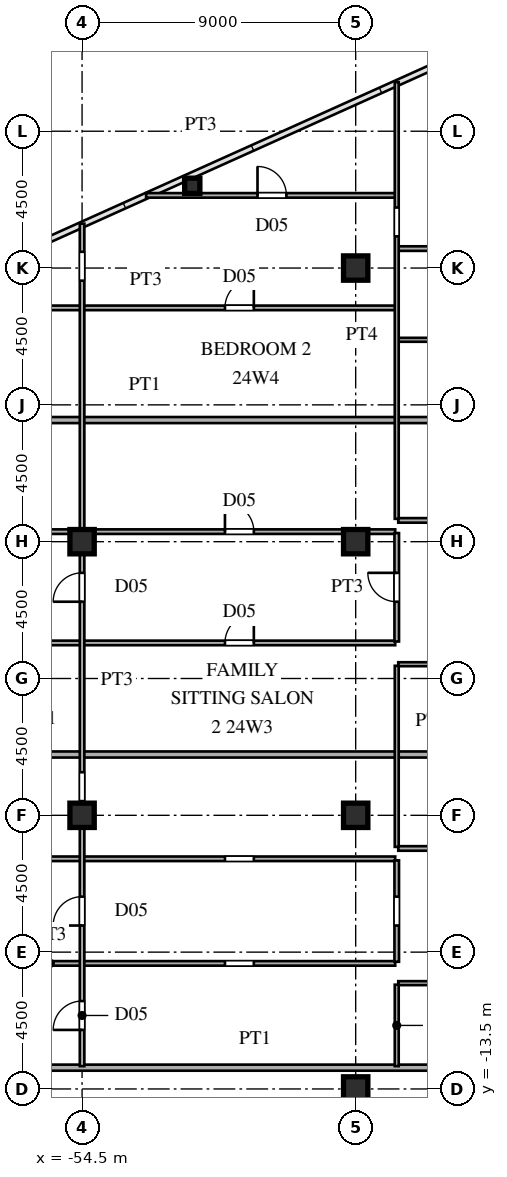
"""IFC4 building model, lengths in metres.
Left out: names, types, materials, properties, quantities, classifications, styles, units other than length and angle.
Written with IfcOpenShell. Run it as: python <this file> out.ifc"""

import sys

from ifc_helpers import new_model, si_unit, direction, frame, frame_2d, origin, origin_2d, place, context, subcontext, project, spatial, rectangle, hollow_rectangle, i_section, extrude, source, transform, mapped, element, fill, save


model = new_model("IFC4")
c1 = context("Model", 3, precision=1e-05, world=origin(), true_north=direction((0.0, 1.0)))
c2 = subcontext(c1, "Body", "Model", "MODEL_VIEW")
j1 = project(units=[si_unit("LENGTHUNIT", "METRE"), si_unit("PLANEANGLEUNIT", "RADIAN")], contexts=[c1])
p1 = place(None, origin())
s1 = spatial("IfcSite", under=j1, at=p1, CompositionType="ELEMENT")
p2 = place(p1, origin())
s2 = spatial("IfcBuilding", under=s1, at=p2, CompositionType="ELEMENT")
p3 = place(p2, frame((0.0, 0.0, 92.4)))
s3 = spatial("IfcBuildingStorey", under=s2, at=p3, CompositionType="ELEMENT", Elevation=92.4)
m1 = source(origin(), c2, "Body", "SweptSolid", [
    extrude(i_section(OverallWidth=0.8, OverallDepth=0.8, WebThickness=0.032, FlangeThickness=0.05, at=origin_2d()), origin(), (0.0, 0.0, 1.0), 3.6),
])
for number, where, z_axis, x_axis in (
    (1, (-45.5, -13.5, 0.0), (0.0, 0.0, 1.0), (1.0, 0.0, 0.0)),
    (2, (-45.5, -4.5, 0.0), (0.0, 0.0, 1.0), (1.0, 0.0, 0.0)),
    (3, (-45.5, 4.5, 0.0), (0.0, 0.0, 1.0), (1.0, 0.0, 0.0)),
    (4, (-45.5, 13.5, 0.0), (0.0, 0.0, 1.0), (1.0, 0.0, 0.0)),
    (5, (-54.5, -4.5, 0.0), (0.0, 0.0, 1.0), (1.0, 0.0, 0.0)),
    (6, (-54.5, 4.5, 0.0), (0.0, 0.0, 1.0), (1.0, 0.0, 0.0)),
):
    element("IfcColumn", number, at=place(p3, frame(where, z_axis=z_axis, x_axis=x_axis)), inside=s3, PredefinedType="COLUMN", context=c2, shape_type="MappedRepresentation", body=[
        mapped(m1, transform((0.0, 0.0, 0.0), scale=1.0)),
    ])
m2 = source(origin(), c2, "Body", "SweptSolid", [
    extrude(hollow_rectangle(XDim=0.5, YDim=0.5, WallThickness=0.02, at=origin_2d()), origin(), (0.0, 0.0, 1.0), 3.6),
])
p4 = place(p3, frame((-50.875, 16.205, 0.0), z_axis=(0.0, 0.0, 1.0), x_axis=(1.0, 0.0, 0.0)))
e7 = element("IfcColumn", 7, at=p4, inside=s3, PredefinedType="COLUMN", context=c2, shape_type="MappedRepresentation", body=[
    mapped(m2, transform((0.0, 0.0, 0.0), scale=1.0)),
])
p5 = place(p3, frame((-59.234, -12.8, 0.0), z_axis=(0.0, 0.0, 1.0), x_axis=(1.0, 0.0, 0.0)))
e8 = element("IfcWall", 8, at=p5, inside=s3, PredefinedType="PARTITIONING", context=c2, shape_type="SweptSolid", body=[
    extrude(rectangle(XDim=20.854, YDim=0.2, at=frame_2d((10.427, 0.0))), origin(), (0.0, 0.0, 1.0), 3.38),
])
p6 = place(p3, frame((-44.1, -10.02, 0.0), z_axis=(0.0, 0.0, 1.0), x_axis=(1.0, 0.0, 0.0)))
e9 = element("IfcWall", 9, at=p6, inside=s3, PredefinedType="PARTITIONING", context=c2, shape_type="SweptSolid", body=[
    extrude(rectangle(XDim=5.75, YDim=0.13, at=frame_2d((2.875, 0.0))), origin(), (0.0, 0.0, 1.0), 3.38),
])
p7 = place(p6, frame((2.435, 0.0, 0.0)))
e10 = element("IfcOpeningElement", 10, at=p7, cuts=e9, PredefinedType="OPENING", context=c2, shape_type="SweptSolid", body=[
    extrude(rectangle(XDim=0.88, YDim=2.1, at=frame_2d((0.44, 1.05))), frame((0.0, 0.075, 0.0), z_axis=(0.0, -1.0, 0.0), x_axis=(1.0, 0.0, 0.0)), (0.0, 0.0, 1.0), 0.15),
])
p8 = place(p3, frame((-66.887, -9.37, 0.0), z_axis=(0.0, 0.0, 1.0), x_axis=(1.0, 0.0, 0.0)))
e11 = element("IfcWall", 11, at=p8, inside=s3, PredefinedType="PARTITIONING", context=c2, shape_type="SweptSolid", body=[
    extrude(rectangle(XDim=22.687, YDim=0.15, at=frame_2d((11.344, 0.0))), origin(), (0.0, 0.0, 1.0), 3.38),
])
p9 = place(p8, frame((17.087, 0.0, 0.0)))
e12 = element("IfcOpeningElement", 12, at=p9, cuts=e11, PredefinedType="OPENING", context=c2, shape_type="SweptSolid", body=[
    extrude(rectangle(XDim=0.95, YDim=2.15, at=frame_2d((0.475, 1.075))), frame((0.0, 0.085, 0.0), z_axis=(0.0, -1.0, 0.0), x_axis=(1.0, 0.0, 0.0)), (0.0, 0.0, 1.0), 0.17),
])
p10 = place(p3, frame((-71.035, -5.93, 0.0), z_axis=(0.0, 0.0, 1.0), x_axis=(1.0, 0.0, 0.0)))
e13 = element("IfcWall", 13, at=p10, inside=s3, PredefinedType="PARTITIONING", context=c2, shape_type="SweptSolid", body=[
    extrude(rectangle(XDim=26.835, YDim=0.15, at=frame_2d((13.417, 0.0))), origin(), (0.0, 0.0, 1.0), 3.38),
])
p11 = place(p10, frame((21.235, 0.0, 0.0)))
e14 = element("IfcOpeningElement", 14, at=p11, cuts=e13, PredefinedType="OPENING", context=c2, shape_type="SweptSolid", body=[
    extrude(rectangle(XDim=0.95, YDim=2.15, at=frame_2d((0.475, 1.075))), frame((0.0, 0.085, 0.0), z_axis=(0.0, -1.0, 0.0), x_axis=(1.0, 0.0, 0.0)), (0.0, 0.0, 1.0), 0.17),
])
p12 = place(p3, frame((-44.1, -5.59, 0.0), z_axis=(0.0, 0.0, 1.0), x_axis=(1.0, 0.0, 0.0)))
e15 = element("IfcWall", 15, at=p12, inside=s3, PredefinedType="PARTITIONING", context=c2, shape_type="SweptSolid", body=[
    extrude(rectangle(XDim=5.75, YDim=0.15, at=frame_2d((2.875, 0.0))), origin(), (0.0, 0.0, 1.0), 3.38),
])
p13 = place(p12, frame((2.4, 0.0, 0.0)))
e16 = element("IfcOpeningElement", 16, at=p13, cuts=e15, PredefinedType="OPENING", context=c2, shape_type="SweptSolid", body=[
    extrude(rectangle(XDim=0.95, YDim=2.15, at=frame_2d((0.475, 1.075))), frame((0.0, 0.085, 0.0), z_axis=(0.0, -1.0, 0.0), x_axis=(1.0, 0.0, 0.0)), (0.0, 0.0, 1.0), 0.17),
])
p14 = place(p3, frame((-71.005, -2.5, 0.0), z_axis=(0.0, 0.0, 1.0), x_axis=(1.0, 0.0, 0.0)))
e17 = element("IfcWall", 17, at=p14, inside=s3, PredefinedType="PARTITIONING", context=c2, shape_type="SweptSolid", body=[
    extrude(rectangle(XDim=32.625, YDim=0.2, at=frame_2d((16.312, 0.0))), origin(), (0.0, 0.0, 1.0), 3.38),
])
p15 = place(p3, frame((-44.1, 0.47, 0.0), z_axis=(0.0, 0.0, 1.0), x_axis=(1.0, 0.0, 0.0)))
e18 = element("IfcWall", 18, at=p15, inside=s3, PredefinedType="PARTITIONING", context=c2, shape_type="SweptSolid", body=[
    extrude(rectangle(XDim=5.75, YDim=0.13, at=frame_2d((2.875, 0.0))), origin(), (0.0, 0.0, 1.0), 3.38),
])
p16 = place(p15, frame((2.435, 0.0, 0.0)))
e19 = element("IfcOpeningElement", 19, at=p16, cuts=e18, PredefinedType="OPENING", context=c2, shape_type="SweptSolid", body=[
    extrude(rectangle(XDim=0.88, YDim=2.1, at=frame_2d((0.44, 1.05))), frame((0.0, 0.075, 0.0), z_axis=(0.0, -1.0, 0.0), x_axis=(1.0, 0.0, 0.0)), (0.0, 0.0, 1.0), 0.15),
])
p17 = place(p3, frame((-71.035, 1.17, 0.0), z_axis=(0.0, 0.0, 1.0), x_axis=(1.0, 0.0, 0.0)))
e20 = element("IfcWall", 20, at=p17, inside=s3, PredefinedType="PARTITIONING", context=c2, shape_type="SweptSolid", body=[
    extrude(rectangle(XDim=26.835, YDim=0.15, at=frame_2d((13.417, 0.0))), origin(), (0.0, 0.0, 1.0), 3.38),
])
p18 = place(p17, frame((21.235, 0.0, 0.0)))
e21 = element("IfcOpeningElement", 21, at=p18, cuts=e20, PredefinedType="OPENING", context=c2, shape_type="SweptSolid", body=[
    extrude(rectangle(XDim=0.95, YDim=2.15, at=frame_2d((0.475, 1.075))), frame((0.0, 0.085, 0.0), z_axis=(0.0, -1.0, 0.0), x_axis=(1.0, 0.0, 0.0)), (0.0, 0.0, 1.0), 0.17),
])
p19 = place(p17, frame((13.21, 0.0, 0.0)))
e22 = element("IfcOpeningElement", 22, at=p19, cuts=e20, PredefinedType="OPENING", context=c2, shape_type="SweptSolid", body=[
    extrude(rectangle(XDim=0.95, YDim=2.15, at=frame_2d((0.475, 1.075))), frame((0.0, 0.085, 0.0), z_axis=(0.0, -1.0, 0.0), x_axis=(1.0, 0.0, 0.0)), (0.0, 0.0, 1.0), 0.17),
])
p20 = place(p3, frame((-71.035, 4.83, 0.0), z_axis=(0.0, 0.0, 1.0), x_axis=(1.0, 0.0, 0.0)))
e23 = element("IfcWall", 23, at=p20, inside=s3, PredefinedType="PARTITIONING", context=c2, shape_type="SweptSolid", body=[
    extrude(rectangle(XDim=26.835, YDim=0.15, at=frame_2d((13.417, 0.0))), origin(), (0.0, 0.0, 1.0), 3.38),
])
p21 = place(p20, frame((21.235, 0.0, 0.0)))
e24 = element("IfcOpeningElement", 24, at=p21, cuts=e23, PredefinedType="OPENING", context=c2, shape_type="SweptSolid", body=[
    extrude(rectangle(XDim=0.95, YDim=2.15, at=frame_2d((0.475, 1.075))), frame((0.0, 0.085, 0.0), z_axis=(0.0, -1.0, 0.0), x_axis=(1.0, 0.0, 0.0)), (0.0, 0.0, 1.0), 0.17),
])
p22 = place(p20, frame((13.21, 0.0, 0.0)))
e25 = element("IfcOpeningElement", 25, at=p22, cuts=e23, PredefinedType="OPENING", context=c2, shape_type="SweptSolid", body=[
    extrude(rectangle(XDim=0.95, YDim=2.15, at=frame_2d((0.475, 1.075))), frame((0.0, 0.085, 0.0), z_axis=(0.0, -1.0, 0.0), x_axis=(1.0, 0.0, 0.0)), (0.0, 0.0, 1.0), 0.17),
])
p23 = place(p3, frame((-44.1, 5.2, 0.0), z_axis=(0.0, 0.0, 1.0), x_axis=(1.0, 0.0, 0.0)))
e26 = element("IfcWall", 26, at=p23, inside=s3, PredefinedType="PARTITIONING", context=c2, shape_type="SweptSolid", body=[
    extrude(rectangle(XDim=5.75, YDim=0.15, at=frame_2d((2.875, 0.0))), origin(), (0.0, 0.0, 1.0), 3.38),
])
p24 = place(p23, frame((2.4, 0.0, 0.0)))
e27 = element("IfcOpeningElement", 27, at=p24, cuts=e26, PredefinedType="OPENING", context=c2, shape_type="SweptSolid", body=[
    extrude(rectangle(XDim=0.95, YDim=2.15, at=frame_2d((0.475, 1.075))), frame((0.0, 0.085, 0.0), z_axis=(0.0, -1.0, 0.0), x_axis=(1.0, 0.0, 0.0)), (0.0, 0.0, 1.0), 0.17),
])
p25 = place(p3, frame((-68.79, 8.5, 0.0), z_axis=(0.0, 0.0, 1.0), x_axis=(1.0, 0.0, 0.0)))
e28 = element("IfcWall", 28, at=p25, inside=s3, PredefinedType="PARTITIONING", context=c2, shape_type="SweptSolid", body=[
    extrude(rectangle(XDim=30.41, YDim=0.2, at=frame_2d((15.205, 0.0))), origin(), (0.0, 0.0, 1.0), 3.38),
])
p26 = place(p3, frame((-44.1, 11.14, 0.0), z_axis=(0.0, 0.0, 1.0), x_axis=(1.0, 0.0, 0.0)))
e29 = element("IfcWall", 29, at=p26, inside=s3, PredefinedType="PARTITIONING", context=c2, shape_type="SweptSolid", body=[
    extrude(rectangle(XDim=5.75, YDim=0.13, at=frame_2d((2.875, 0.0))), origin(), (0.0, 0.0, 1.0), 3.38),
])
p27 = place(p26, frame((2.435, 0.0, 0.0)))
e30 = element("IfcOpeningElement", 30, at=p27, cuts=e29, PredefinedType="OPENING", context=c2, shape_type="SweptSolid", body=[
    extrude(rectangle(XDim=0.88, YDim=2.1, at=frame_2d((0.44, 1.05))), frame((0.0, 0.075, 0.0), z_axis=(0.0, -1.0, 0.0), x_axis=(1.0, 0.0, 0.0)), (0.0, 0.0, 1.0), 0.15),
])
p28 = place(p3, frame((-60.603, 12.19, 0.0), z_axis=(0.0, 0.0, 1.0), x_axis=(1.0, 0.0, 0.0)))
e31 = element("IfcWall", 31, at=p28, inside=s3, PredefinedType="PARTITIONING", context=c2, shape_type="SweptSolid", body=[
    extrude(rectangle(XDim=16.403, YDim=0.15, at=frame_2d((8.202, 0.0))), origin(), (0.0, 0.0, 1.0), 3.38),
])
p29 = place(p28, frame((10.803, 0.0, 0.0)))
e32 = element("IfcOpeningElement", 32, at=p29, cuts=e31, PredefinedType="OPENING", context=c2, shape_type="SweptSolid", body=[
    extrude(rectangle(XDim=0.95, YDim=2.15, at=frame_2d((0.475, 1.075))), frame((0.0, 0.085, 0.0), z_axis=(0.0, -1.0, 0.0), x_axis=(1.0, 0.0, 0.0)), (0.0, 0.0, 1.0), 0.17),
])
p30 = place(p28, frame((2.594, 0.0, 0.0)))
e33 = element("IfcOpeningElement", 33, at=p30, cuts=e31, PredefinedType="OPENING", context=c2, shape_type="SweptSolid", body=[
    extrude(rectangle(XDim=0.95, YDim=2.15, at=frame_2d((0.475, 1.075))), frame((0.0, 0.085, 0.0), z_axis=(0.0, -1.0, 0.0), x_axis=(1.0, 0.0, 0.0)), (0.0, 0.0, 1.0), 0.17),
])
p31 = place(p3, frame((-44.1, 14.14, 0.0), z_axis=(0.0, 0.0, 1.0), x_axis=(1.0, 0.0, 0.0)))
e34 = element("IfcWall", 34, at=p31, inside=s3, PredefinedType="PARTITIONING", context=c2, shape_type="SweptSolid", body=[
    extrude(rectangle(XDim=5.75, YDim=0.15, at=frame_2d((2.875, 0.0))), origin(), (0.0, 0.0, 1.0), 3.38),
])
p32 = place(p31, frame((2.4, 0.0, 0.0)))
e35 = element("IfcOpeningElement", 35, at=p32, cuts=e34, PredefinedType="OPENING", context=c2, shape_type="SweptSolid", body=[
    extrude(rectangle(XDim=0.95, YDim=2.15, at=frame_2d((0.475, 1.075))), frame((0.0, 0.085, 0.0), z_axis=(0.0, -1.0, 0.0), x_axis=(1.0, 0.0, 0.0)), (0.0, 0.0, 1.0), 0.17),
])
p33 = place(p3, frame((-52.394, 15.89, 0.0), z_axis=(0.0, 0.0, 1.0), x_axis=(1.0, 0.0, 0.0)))
e36 = element("IfcWall", 36, at=p33, inside=s3, PredefinedType="PARTITIONING", context=c2, shape_type="SweptSolid", body=[
    extrude(rectangle(XDim=8.194, YDim=0.15, at=frame_2d((4.097, 0.0))), origin(), (0.0, 0.0, 1.0), 3.38),
])
p34 = place(p33, frame((3.664, 0.0, 0.0)))
e37 = element("IfcOpeningElement", 37, at=p34, cuts=e36, PredefinedType="OPENING", context=c2, shape_type="SweptSolid", body=[
    extrude(rectangle(XDim=0.95, YDim=2.15, at=frame_2d((0.475, 1.075))), frame((0.0, 0.085, 0.0), z_axis=(0.0, -1.0, 0.0), x_axis=(1.0, 0.0, 0.0)), (0.0, 0.0, 1.0), 0.17),
])
p35 = place(p3, frame((-54.5, -12.75, 0.0), z_axis=(0.0, 0.0, 1.0), x_axis=(0.0, 1.0, 0.0)))
e38 = element("IfcWall", 38, at=p35, inside=s3, PredefinedType="PARTITIONING", context=c2, shape_type="SweptSolid", body=[
    extrude(rectangle(XDim=27.71, YDim=0.15, at=frame_2d((13.855, 0.0))), origin(), (0.0, 0.0, 1.0), 2.68),
])
p36 = place(p35, frame((4.625, 0.0, 0.0)))
e39 = element("IfcOpeningElement", 39, at=p36, cuts=e38, PredefinedType="OPENING", context=c2, shape_type="SweptSolid", body=[
    extrude(rectangle(XDim=0.95, YDim=2.15, at=frame_2d((0.475, 1.075))), frame((0.0, 0.085, 0.0), z_axis=(0.0, -1.0, 0.0), x_axis=(1.0, 0.0, 0.0)), (0.0, 0.0, 1.0), 0.17),
])
p37 = place(p35, frame((1.192, 0.0, 0.0)))
e40 = element("IfcOpeningElement", 40, at=p37, cuts=e38, PredefinedType="OPENING", context=c2, shape_type="SweptSolid", body=[
    extrude(rectangle(XDim=0.95, YDim=2.15, at=frame_2d((0.475, 1.075))), frame((0.0, 0.085, 0.0), z_axis=(0.0, -1.0, 0.0), x_axis=(1.0, 0.0, 0.0)), (0.0, 0.0, 1.0), 0.17),
])
p38 = place(p35, frame((8.717, 0.0, 0.0)))
e41 = element("IfcOpeningElement", 41, at=p38, cuts=e38, PredefinedType="OPENING", context=c2, shape_type="SweptSolid", body=[
    extrude(rectangle(XDim=0.95, YDim=2.15, at=frame_2d((0.475, 1.075))), frame((0.0, 0.085, 0.0), z_axis=(0.0, -1.0, 0.0), x_axis=(1.0, 0.0, 0.0)), (0.0, 0.0, 1.0), 0.17),
])
p39 = place(p35, frame((15.275, 0.0, 0.0)))
e42 = element("IfcOpeningElement", 42, at=p39, cuts=e38, PredefinedType="OPENING", context=c2, shape_type="SweptSolid", body=[
    extrude(rectangle(XDim=0.95, YDim=2.15, at=frame_2d((0.475, 1.075))), frame((0.0, 0.085, 0.0), z_axis=(0.0, -1.0, 0.0), x_axis=(1.0, 0.0, 0.0)), (0.0, 0.0, 1.0), 0.17),
])
p40 = place(p35, frame((25.835, 0.0, 0.0)))
e43 = element("IfcOpeningElement", 43, at=p40, cuts=e38, PredefinedType="OPENING", context=c2, shape_type="SweptSolid", body=[
    extrude(rectangle(XDim=0.95, YDim=2.15, at=frame_2d((0.475, 1.075))), frame((0.0, 0.085, 0.0), z_axis=(0.0, -1.0, 0.0), x_axis=(1.0, 0.0, 0.0)), (0.0, 0.0, 1.0), 0.17),
])
p41 = place(p3, frame((-44.15, -12.75, 0.0), z_axis=(0.0, 0.0, 1.0), x_axis=(0.0, 1.0, 0.0)))
e44 = element("IfcWall", 44, at=p41, inside=s3, PredefinedType="PARTITIONING", context=c2, shape_type="SweptSolid", body=[
    extrude(rectangle(XDim=2.679, YDim=0.13, at=frame_2d((1.339, 0.0))), origin(), (0.0, 0.0, 1.0), 3.38),
])
p42 = place(p3, frame((-44.15, -9.317, 0.0), z_axis=(0.0, 0.0, 1.0), x_axis=(0.0, 1.0, 0.0)))
e45 = element("IfcWall", 45, at=p42, inside=s3, PredefinedType="PARTITIONING", context=c2, shape_type="SweptSolid", body=[
    extrude(rectangle(XDim=3.334, YDim=0.15, at=frame_2d((1.667, 0.0))), origin(), (0.0, 0.0, 1.0), 3.38),
])
p43 = place(p42, frame((1.192, 0.0, 0.0)))
e46 = element("IfcOpeningElement", 46, at=p43, cuts=e45, PredefinedType="OPENING", context=c2, shape_type="SweptSolid", body=[
    extrude(rectangle(XDim=0.95, YDim=2.15, at=frame_2d((0.475, 1.075))), frame((0.0, 0.085, 0.0), z_axis=(0.0, -1.0, 0.0), x_axis=(1.0, 0.0, 0.0)), (0.0, 0.0, 1.0), 0.17),
])
p44 = place(p3, frame((-44.15, -5.538, 0.0), z_axis=(0.0, 0.0, 1.0), x_axis=(0.0, 1.0, 0.0)))
e47 = element("IfcWall", 47, at=p44, inside=s3, PredefinedType="PARTITIONING", context=c2, shape_type="SweptSolid", body=[
    extrude(rectangle(XDim=5.956, YDim=0.13, at=frame_2d((2.978, 0.0))), origin(), (0.0, 0.0, 1.0), 3.38),
])
p45 = place(p3, frame((-44.15, 1.217, 0.0), z_axis=(0.0, 0.0, 1.0), x_axis=(0.0, 1.0, 0.0)))
e48 = element("IfcWall", 48, at=p45, inside=s3, PredefinedType="PARTITIONING", context=c2, shape_type="SweptSolid", body=[
    extrude(rectangle(XDim=3.566, YDim=0.15, at=frame_2d((1.783, 0.0))), origin(), (0.0, 0.0, 1.0), 3.38),
])
p46 = place(p45, frame((1.308, 0.0, 0.0)))
e49 = element("IfcOpeningElement", 49, at=p46, cuts=e48, PredefinedType="OPENING", context=c2, shape_type="SweptSolid", body=[
    extrude(rectangle(XDim=0.95, YDim=2.15, at=frame_2d((0.475, 1.075))), frame((0.0, 0.085, 0.0), z_axis=(0.0, -1.0, 0.0), x_axis=(1.0, 0.0, 0.0)), (0.0, 0.0, 1.0), 0.17),
])
p47 = place(p3, frame((-44.15, 5.252, 0.0), z_axis=(0.0, 0.0, 1.0), x_axis=(0.0, 1.0, 0.0)))
e50 = element("IfcWall", 50, at=p47, inside=s3, PredefinedType="PARTITIONING", context=c2, shape_type="SweptSolid", body=[
    extrude(rectangle(XDim=14.365, YDim=0.13, at=frame_2d((7.183, 0.0))), origin(), (0.0, 0.0, 1.0), 3.38),
])
p48 = place(p47, frame((9.29, 0.0, 0.0)))
e51 = element("IfcOpeningElement", 51, at=p48, cuts=e50, PredefinedType="OPENING", context=c2, shape_type="SweptSolid", body=[
    extrude(rectangle(XDim=0.95, YDim=2.15, at=frame_2d((0.475, 1.075))), frame((0.0, 0.075, 0.0), z_axis=(0.0, -1.0, 0.0), x_axis=(1.0, 0.0, 0.0)), (0.0, 0.0, 1.0), 0.15),
])
m3 = source(origin(), c2, "Body", "SweptSolid", [
    extrude(rectangle(XDim=0.95, YDim=2.15, at=frame_2d((0.475, 1.075))), frame((0.0, 0.025, 0.0), z_axis=(0.0, -1.0, 0.0), x_axis=(1.0, 0.0, 0.0)), (0.0, 0.0, 1.0), 0.05),
])
p49 = place(p18, origin())
e52 = element("IfcDoor", 52, at=p49, inside=s3, OperationType="SINGLE_SWING_RIGHT", PredefinedType="DOOR", context=c2, shape_type="MappedRepresentation", body=[
    mapped(m3, transform((0.0, 0.0, 0.0), scale=1.0)),
])
fill(e21, e52)
p50 = place(p21, origin())
e53 = element("IfcDoor", 53, at=p50, inside=s3, OperationType="SINGLE_SWING_LEFT", PredefinedType="DOOR", context=c2, shape_type="MappedRepresentation", body=[
    mapped(m3, transform((0.0, 0.0, 0.0), scale=1.0)),
])
fill(e24, e53)
p51 = place(p29, origin())
e54 = element("IfcDoor", 54, at=p51, inside=s3, OperationType="SINGLE_SWING_RIGHT", PredefinedType="DOOR", context=c2, shape_type="MappedRepresentation", body=[
    mapped(m3, transform((0.0, 0.0, 0.0), scale=1.0)),
])
fill(e32, e54)
p52 = place(p34, origin())
e55 = element("IfcDoor", 55, at=p52, inside=s3, OperationType="SINGLE_SWING_LEFT", PredefinedType="DOOR", context=c2, shape_type="MappedRepresentation", body=[
    mapped(m3, transform((0.0, 0.0, 0.0), scale=1.0)),
])
fill(e37, e55)
p53 = place(p36, origin())
e56 = element("IfcDoor", 56, at=p53, inside=s3, OperationType="SINGLE_SWING_LEFT", PredefinedType="DOOR", context=c2, shape_type="MappedRepresentation", body=[
    mapped(m3, transform((0.0, 0.0, 0.0), scale=1.0)),
])
fill(e39, e56)
p54 = place(p37, origin())
e57 = element("IfcDoor", 57, at=p54, inside=s3, OperationType="SINGLE_SWING_LEFT", PredefinedType="DOOR", context=c2, shape_type="MappedRepresentation", body=[
    mapped(m3, transform((0.0, 0.0, 0.0), scale=1.0)),
])
fill(e40, e57)
p55 = place(p39, origin())
e58 = element("IfcDoor", 58, at=p55, inside=s3, OperationType="SINGLE_SWING_LEFT", PredefinedType="DOOR", context=c2, shape_type="MappedRepresentation", body=[
    mapped(m3, transform((0.0, 0.0, 0.0), scale=1.0)),
])
fill(e42, e58)
p56 = place(p46, origin())
e59 = element("IfcDoor", 59, at=p56, inside=s3, OperationType="SINGLE_SWING_RIGHT", PredefinedType="DOOR", context=c2, shape_type="MappedRepresentation", body=[
    mapped(m3, transform((0.0, 0.0, 0.0), scale=1.0)),
])
fill(e49, e59)
save(model, sys.argv[1])
